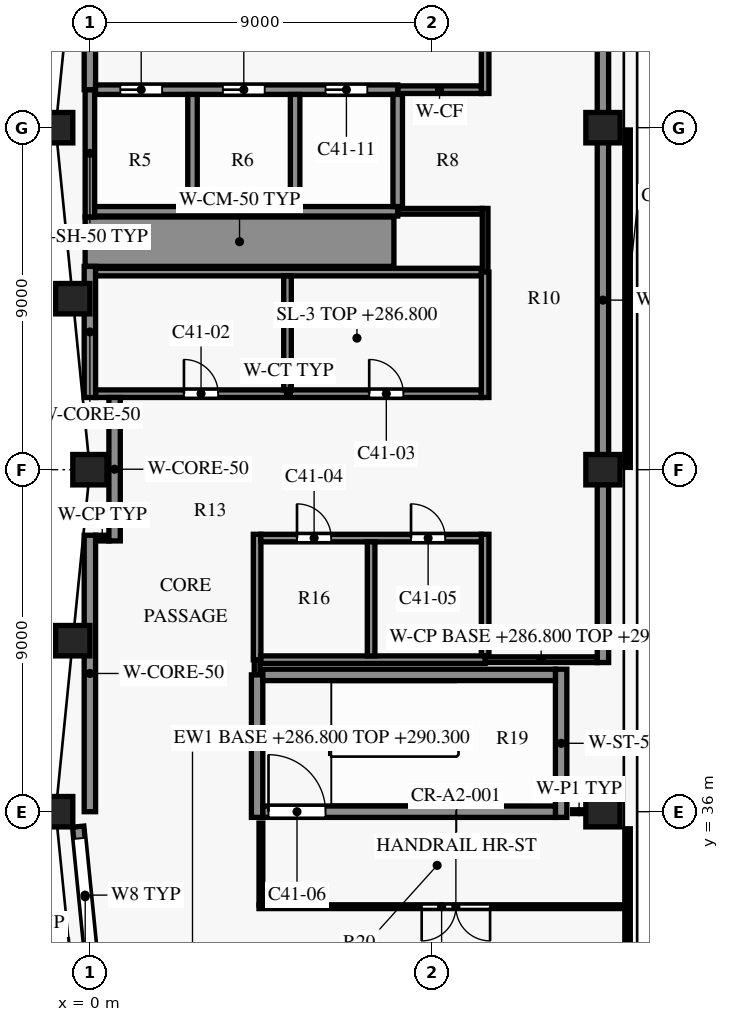
"""IFC4 building model, lengths in metres.
Left out: names, types, materials, properties, quantities, classifications, styles, units other than length and angle.
Written with IfcOpenShell. Run it as: python <this file> out.ifc"""

import sys

from ifc_helpers import new_model, si_unit, direction, frame, frame_2d, origin, origin_2d, place, context, subcontext, project, spatial, rectangle, extrude, element, fill, save


model = new_model("IFC4")
c1 = context("Model", 3, precision=1e-05, world=origin(), true_north=direction((0.0, 1.0)))
c2 = subcontext(c1, "Body", "Model", "MODEL_VIEW")
j1 = project(units=[si_unit("LENGTHUNIT", "METRE"), si_unit("PLANEANGLEUNIT", "RADIAN")], contexts=[c1])
p1 = place(None, origin())
s1 = spatial("IfcSite", under=j1, at=p1, CompositionType="ELEMENT")
p2 = place(p1, origin())
s2 = spatial("IfcBuilding", under=s1, at=p2, CompositionType="ELEMENT")
p3 = place(p2, frame((0.0, 0.0, 286.8)))
s3 = spatial("IfcBuildingStorey", under=s2, at=p3, CompositionType="ELEMENT", Elevation=286.8)
for number, where, z_axis, x_axis in (
    (1, (13.5, 36.0, 0.0), (0.0, 0.0, 1.0), (1.0, 0.0, 0.0)),
    (2, (13.5, 45.0, 0.0), (0.0, 0.0, 1.0), (1.0, 0.0, 0.0)),
    (3, (13.5, 54.0, 0.0), (0.0, 0.0, 1.0), (1.0, 0.0, 0.0)),
    (4, (-0.9, 54.0, 0.0), (0.0, 0.0, 1.0), (0.0, -1.0, 0.0)),
    (5, (-0.45, 49.5, 0.0), (0.0, 0.0, 1.0), (0.1, -0.995, 0.0)),
    (6, (0.0, 45.0, 0.0), (0.0, 0.0, 1.0), (0.0, -1.0, 0.0)),
    (7, (-0.45, 40.5, 0.0), (0.0, 0.0, 1.0), (-0.1, -0.995, 0.0)),
    (8, (-0.9, 36.0, 0.0), (0.0, 0.0, 1.0), (0.0, -1.0, 0.0)),
):
    element("IfcColumn", number, at=place(p3, frame(where, z_axis=z_axis, x_axis=x_axis)), inside=s3, PredefinedType="COLUMN", context=c2, shape_type="SweptSolid", body=[
        extrude(rectangle(XDim=0.9, YDim=0.8, at=origin_2d()), origin(), (0.0, 0.0, 1.0), 4.0),
    ])
p4 = place(p3, frame((0.061, 31.915, 0.0), z_axis=(0.0, 0.0, 1.0), x_axis=(-0.099549320092, 0.995032629048, 0.0)))
e9 = element("IfcWall", 9, at=p4, inside=s3, PredefinedType="SOLIDWALL", context=c2, shape_type="SweptSolid", body=[
    extrude(rectangle(XDim=3.71, YDim=0.3, at=frame_2d((1.855, 0.0))), origin(), (0.0, 0.0, 1.0), 3.5),
])
p5 = place(p4, frame((0.399, 0.0, 0.9)))
e10 = element("IfcOpeningElement", 10, at=p5, cuts=e9, PredefinedType="OPENING", context=c2, shape_type="SweptSolid", body=[
    extrude(rectangle(XDim=3.0, YDim=1.8, at=frame_2d((1.5, 0.9))), frame((0.0, 0.16, 0.0), z_axis=(0.0, -1.0, 0.0), x_axis=(1.0, 0.0, 0.0)), (0.0, 0.0, 1.0), 0.32),
])
p6 = place(p3, frame((4.55, 36.0, 0.0), z_axis=(0.0, 0.0, 1.0), x_axis=(1.0, 0.0, 0.0)))
e11 = element("IfcWall", 11, at=p6, inside=s3, PredefinedType="SHEAR", context=c2, shape_type="SweptSolid", body=[
    extrude(rectangle(XDim=7.7, YDim=0.3, at=frame_2d((3.85, 0.0))), origin(), (0.0, 0.0, 1.0), 3.7),
])
p7 = place(p6, frame((0.15, 0.0, 0.0)))
e12 = element("IfcOpeningElement", 12, at=p7, cuts=e11, PredefinedType="OPENING", context=c2, shape_type="SweptSolid", body=[
    extrude(rectangle(XDim=1.5, YDim=2.2, at=frame_2d((0.75, 1.1))), frame((0.0, 0.16, 0.0), z_axis=(0.0, -1.0, 0.0), x_axis=(1.0, 0.0, 0.0)), (0.0, 0.0, 1.0), 0.32),
])
p8 = place(p3, frame((4.55, 39.6, 0.0), z_axis=(0.0, 0.0, 1.0), x_axis=(1.0, 0.0, 0.0)))
e13 = element("IfcWall", 13, at=p8, inside=s3, PredefinedType="SHEAR", context=c2, shape_type="SweptSolid", body=[
    extrude(rectangle(XDim=7.7, YDim=0.3, at=frame_2d((3.85, 0.0))), origin(), (0.0, 0.0, 1.0), 3.7),
])
p9 = place(p3, frame((10.4, 40.0, 0.0), z_axis=(0.0, 0.0, 1.0), x_axis=(1.0, 0.0, 0.0)))
e14 = element("IfcWall", 14, at=p9, inside=s3, PredefinedType="PARTITIONING", context=c2, shape_type="SweptSolid", body=[
    extrude(rectangle(XDim=2.95, YDim=0.15, at=frame_2d((1.475, 0.0))), origin(), (0.0, 0.0, 1.0), 3.35),
])
p10 = place(p3, frame((4.5, 40.0, 0.0), z_axis=(0.0, 0.0, 1.0), x_axis=(1.0, 0.0, 0.0)))
e15 = element("IfcWall", 15, at=p10, inside=s3, PredefinedType="PARTITIONING", context=c2, shape_type="SweptSolid", body=[
    extrude(rectangle(XDim=5.9, YDim=0.2, at=frame_2d((2.95, 0.0))), origin(), (0.0, 0.0, 1.0), 3.7),
])
p11 = place(p3, frame((0.15, 43.2, 0.0), z_axis=(0.0, 0.0, 1.0), x_axis=(1.0, 0.0, 0.0)))
e16 = element("IfcWall", 16, at=p11, inside=s3, PredefinedType="PARTITIONING", context=c2, shape_type="SweptSolid", body=[
    extrude(rectangle(XDim=0.35, YDim=0.15, at=frame_2d((0.175, 0.0))), origin(), (0.0, 0.0, 1.0), 3.7),
])
p12 = place(p3, frame((4.5, 43.2, 0.0), z_axis=(0.0, 0.0, 1.0), x_axis=(1.0, 0.0, 0.0)))
e17 = element("IfcWall", 17, at=p12, inside=s3, PredefinedType="PARTITIONING", context=c2, shape_type="SweptSolid", body=[
    extrude(rectangle(XDim=5.8, YDim=0.2, at=frame_2d((2.9, 0.0))), origin(), (0.0, 0.0, 1.0), 3.7),
])
p13 = place(p12, frame((0.95, 0.0, 0.0)))
e18 = element("IfcOpeningElement", 18, at=p13, cuts=e17, PredefinedType="OPENING", context=c2, shape_type="SweptSolid", body=[
    extrude(rectangle(XDim=0.9, YDim=2.1, at=frame_2d((0.45, 1.05))), frame((0.0, 0.11, 0.0), z_axis=(0.0, -1.0, 0.0), x_axis=(1.0, 0.0, 0.0)), (0.0, 0.0, 1.0), 0.22),
])
p14 = place(p12, frame((3.95, 0.0, 0.0)))
e19 = element("IfcOpeningElement", 19, at=p14, cuts=e17, PredefinedType="OPENING", context=c2, shape_type="SweptSolid", body=[
    extrude(rectangle(XDim=0.9, YDim=2.1, at=frame_2d((0.45, 1.05))), frame((0.0, 0.11, 0.0), z_axis=(0.0, -1.0, 0.0), x_axis=(1.0, 0.0, 0.0)), (0.0, 0.0, 1.0), 0.22),
])
p15 = place(p3, frame((0.15, 47.0, 0.0), z_axis=(0.0, 0.0, 1.0), x_axis=(1.0, 0.0, 0.0)))
e20 = element("IfcWall", 20, at=p15, inside=s3, PredefinedType="PARTITIONING", context=c2, shape_type="SweptSolid", body=[
    extrude(rectangle(XDim=10.15, YDim=0.2, at=frame_2d((5.075, 0.0))), origin(), (0.0, 0.0, 1.0), 3.7),
])
p16 = place(p15, frame((2.325, 0.0, 0.0)))
e21 = element("IfcOpeningElement", 21, at=p16, cuts=e20, PredefinedType="OPENING", context=c2, shape_type="SweptSolid", body=[
    extrude(rectangle(XDim=0.9, YDim=2.1, at=frame_2d((0.45, 1.05))), frame((0.0, 0.11, 0.0), z_axis=(0.0, -1.0, 0.0), x_axis=(1.0, 0.0, 0.0)), (0.0, 0.0, 1.0), 0.22),
])
p17 = place(p15, frame((7.2, 0.0, 0.0)))
e22 = element("IfcOpeningElement", 22, at=p17, cuts=e20, PredefinedType="OPENING", context=c2, shape_type="SweptSolid", body=[
    extrude(rectangle(XDim=0.9, YDim=2.1, at=frame_2d((0.45, 1.05))), frame((0.0, 0.11, 0.0), z_axis=(0.0, -1.0, 0.0), x_axis=(1.0, 0.0, 0.0)), (0.0, 0.0, 1.0), 0.22),
])
p18 = place(p3, frame((0.15, 50.2, 0.0), z_axis=(0.0, 0.0, 1.0), x_axis=(1.0, 0.0, 0.0)))
e23 = element("IfcWall", 23, at=p18, inside=s3, PredefinedType="PARTITIONING", context=c2, shape_type="SweptSolid", body=[
    extrude(rectangle(XDim=10.15, YDim=0.2, at=frame_2d((5.075, 0.0))), origin(), (0.0, 0.0, 1.0), 3.7),
])
p19 = place(p3, frame((-0.125, 51.0, 0.0), z_axis=(0.0, 0.0, 1.0), x_axis=(1.0, 0.0, 0.0)))
e24 = element("IfcWall", 24, at=p19, inside=s3, PredefinedType="SHEAR", context=c2, shape_type="SweptSolid", body=[
    extrude(rectangle(XDim=8.125, YDim=1.3, at=frame_2d((4.062, 0.0))), origin(), (0.0, 0.0, 1.0), 3.7),
])
p20 = place(p3, frame((8.1, 51.8, 0.0), z_axis=(0.0, 0.0, 1.0), x_axis=(1.0, 0.0, 0.0)))
e25 = element("IfcWall", 25, at=p20, inside=s3, PredefinedType="PARTITIONING", context=c2, shape_type="SweptSolid", body=[
    extrude(rectangle(XDim=2.225, YDim=0.15, at=frame_2d((1.112, 0.0))), origin(), (0.0, 0.0, 1.0), 3.7),
])
p21 = place(p3, frame((0.125, 51.8, 0.0), z_axis=(0.0, 0.0, 1.0), x_axis=(1.0, 0.0, 0.0)))
e26 = element("IfcWall", 26, at=p21, inside=s3, PredefinedType="SHEAR", context=c2, shape_type="SweptSolid", body=[
    extrude(rectangle(XDim=7.975, YDim=0.25, at=frame_2d((3.988, 0.0))), origin(), (0.0, 0.0, 1.0), 3.7),
])
p22 = place(p3, frame((8.1, 55.0, 0.0), z_axis=(0.0, 0.0, 1.0), x_axis=(1.0, 0.0, 0.0)))
e27 = element("IfcWall", 27, at=p22, inside=s3, PredefinedType="PARTITIONING", context=c2, shape_type="SweptSolid", body=[
    extrude(rectangle(XDim=2.2, YDim=0.2, at=frame_2d((1.1, 0.0))), origin(), (0.0, 0.0, 1.0), 3.7),
])
p23 = place(p3, frame((0.15, 55.0, 0.0), z_axis=(0.0, 0.0, 1.0), x_axis=(1.0, 0.0, 0.0)))
e28 = element("IfcWall", 28, at=p23, inside=s3, PredefinedType="SHEAR", context=c2, shape_type="SweptSolid", body=[
    extrude(rectangle(XDim=7.95, YDim=0.25, at=frame_2d((3.975, 0.0))), origin(), (0.0, 0.0, 1.0), 3.7),
])
p24 = place(p23, frame((0.65, 0.0, 0.0)))
e29 = element("IfcOpeningElement", 29, at=p24, cuts=e28, PredefinedType="OPENING", context=c2, shape_type="SweptSolid", body=[
    extrude(rectangle(XDim=1.1, YDim=2.1, at=frame_2d((0.55, 1.05))), frame((0.0, 0.135, 0.0), z_axis=(0.0, -1.0, 0.0), x_axis=(1.0, 0.0, 0.0)), (0.0, 0.0, 1.0), 0.27),
])
p25 = place(p23, frame((3.35, 0.0, 0.0)))
e30 = element("IfcOpeningElement", 30, at=p25, cuts=e28, PredefinedType="OPENING", context=c2, shape_type="SweptSolid", body=[
    extrude(rectangle(XDim=1.1, YDim=2.1, at=frame_2d((0.55, 1.05))), frame((0.0, 0.135, 0.0), z_axis=(0.0, -1.0, 0.0), x_axis=(1.0, 0.0, 0.0)), (0.0, 0.0, 1.0), 0.27),
])
p26 = place(p23, frame((6.05, 0.0, 0.0)))
e31 = element("IfcOpeningElement", 31, at=p26, cuts=e28, PredefinedType="OPENING", context=c2, shape_type="SweptSolid", body=[
    extrude(rectangle(XDim=1.1, YDim=2.1, at=frame_2d((0.55, 1.05))), frame((0.0, 0.135, 0.0), z_axis=(0.0, -1.0, 0.0), x_axis=(1.0, 0.0, 0.0)), (0.0, 0.0, 1.0), 0.27),
])
p27 = place(p3, frame((0.0, 36.0, 0.0), z_axis=(0.0, 0.0, 1.0), x_axis=(0.0, 1.0, 0.0)))
e32 = element("IfcWall", 32, at=p27, inside=s3, PredefinedType="SHEAR", context=c2, shape_type="SweptSolid", body=[
    extrude(rectangle(XDim=7.275, YDim=0.3, at=frame_2d((3.637, 0.0))), origin(), (0.0, 0.0, 1.0), 3.7),
])
p28 = place(p3, frame((0.0, 46.9, 0.0), z_axis=(0.0, 0.0, 1.0), x_axis=(0.0, 1.0, 0.0)))
e33 = element("IfcWall", 33, at=p28, inside=s3, PredefinedType="SHEAR", context=c2, shape_type="SweptSolid", body=[
    extrude(rectangle(XDim=3.45, YDim=0.3, at=frame_2d((1.725, 0.0))), origin(), (0.0, 0.0, 1.0), 3.7),
])
p29 = place(p3, frame((0.0, 55.0, 0.0), z_axis=(0.0, 0.0, 1.0), x_axis=(0.0, 1.0, 0.0)))
e34 = element("IfcWall", 34, at=p29, inside=s3, PredefinedType="SHEAR", context=c2, shape_type="SweptSolid", body=[
    extrude(rectangle(XDim=3.0, YDim=0.3, at=frame_2d((1.5, 0.0))), origin(), (0.0, 0.0, 1.0), 3.7),
])
p30 = place(p3, frame((0.0, 51.65, 0.0), z_axis=(0.0, 0.0, 1.0), x_axis=(0.0, 1.0, 0.0)))
e35 = element("IfcWall", 35, at=p30, inside=s3, PredefinedType="SHEAR", context=c2, shape_type="SweptSolid", body=[
    extrude(rectangle(XDim=3.35, YDim=0.25, at=frame_2d((1.675, 0.0))), origin(), (0.0, 0.0, 1.0), 3.7),
])
p31 = place(p3, frame((0.65, 43.125, 0.0), z_axis=(0.0, 0.0, 1.0), x_axis=(0.0, 1.0, 0.0)))
e36 = element("IfcWall", 36, at=p31, inside=s3, PredefinedType="SHEAR", context=c2, shape_type="SweptSolid", body=[
    extrude(rectangle(XDim=3.775, YDim=0.3, at=frame_2d((1.887, 0.0))), origin(), (0.0, 0.0, 1.0), 3.7),
])
p32 = place(p3, frame((2.7, 51.925, 0.0), z_axis=(0.0, 0.0, 1.0), x_axis=(0.0, 1.0, 0.0)))
e37 = element("IfcWall", 37, at=p32, inside=s3, PredefinedType="SHEAR", context=c2, shape_type="SweptSolid", body=[
    extrude(rectangle(XDim=2.95, YDim=0.25, at=frame_2d((1.475, 0.0))), origin(), (0.0, 0.0, 1.0), 3.7),
])
p33 = place(p3, frame((4.4, 39.6, 0.0), z_axis=(0.0, 0.0, 1.0), x_axis=(0.0, 1.0, 0.0)))
e38 = element("IfcWall", 38, at=p33, inside=s3, PredefinedType="PARTITIONING", context=c2, shape_type="SweptSolid", body=[
    extrude(rectangle(XDim=0.4, YDim=0.15, at=frame_2d((0.2, 0.0))), origin(), (0.0, 0.0, 1.0), 3.7),
])
p34 = place(p3, frame((4.4, 40.0, 0.0), z_axis=(0.0, 0.0, 1.0), x_axis=(0.0, 1.0, 0.0)))
e39 = element("IfcWall", 39, at=p34, inside=s3, PredefinedType="PARTITIONING", context=c2, shape_type="SweptSolid", body=[
    extrude(rectangle(XDim=3.3, YDim=0.2, at=frame_2d((1.65, 0.0))), origin(), (0.0, 0.0, 1.0), 3.7),
])
p35 = place(p3, frame((4.4, 35.85, 0.0), z_axis=(0.0, 0.0, 1.0), x_axis=(0.0, 1.0, 0.0)))
e40 = element("IfcWall", 40, at=p35, inside=s3, PredefinedType="SHEAR", context=c2, shape_type="SweptSolid", body=[
    extrude(rectangle(XDim=3.75, YDim=0.3, at=frame_2d((1.875, 0.0))), origin(), (0.0, 0.0, 1.0), 3.7),
])
p36 = place(p3, frame((5.2, 47.1, 0.0), z_axis=(0.0, 0.0, 1.0), x_axis=(0.0, 1.0, 0.0)))
e41 = element("IfcWall", 41, at=p36, inside=s3, PredefinedType="PARTITIONING", context=c2, shape_type="SweptSolid", body=[
    extrude(rectangle(XDim=3.0, YDim=0.2, at=frame_2d((1.5, 0.0))), origin(), (0.0, 0.0, 1.0), 3.7),
])
p37 = place(p3, frame((5.4, 51.925, 0.0), z_axis=(0.0, 0.0, 1.0), x_axis=(0.0, 1.0, 0.0)))
e42 = element("IfcWall", 42, at=p37, inside=s3, PredefinedType="SHEAR", context=c2, shape_type="SweptSolid", body=[
    extrude(rectangle(XDim=2.95, YDim=0.25, at=frame_2d((1.475, 0.0))), origin(), (0.0, 0.0, 1.0), 3.7),
])
p38 = place(p3, frame((7.4, 40.1, 0.0), z_axis=(0.0, 0.0, 1.0), x_axis=(0.0, 1.0, 0.0)))
e43 = element("IfcWall", 43, at=p38, inside=s3, PredefinedType="PARTITIONING", context=c2, shape_type="SweptSolid", body=[
    extrude(rectangle(XDim=3.0, YDim=0.2, at=frame_2d((1.5, 0.0))), origin(), (0.0, 0.0, 1.0), 3.7),
])
p39 = place(p3, frame((8.1, 51.925, 0.0), z_axis=(0.0, 0.0, 1.0), x_axis=(0.0, 1.0, 0.0)))
e44 = element("IfcWall", 44, at=p39, inside=s3, PredefinedType="SHEAR", context=c2, shape_type="SweptSolid", body=[
    extrude(rectangle(XDim=2.95, YDim=0.25, at=frame_2d((1.475, 0.0))), origin(), (0.0, 0.0, 1.0), 3.7),
])
p40 = place(p3, frame((10.4, 54.9, 0.0), z_axis=(0.0, 0.0, 1.0), x_axis=(0.0, 1.0, 0.0)))
e45 = element("IfcWall", 45, at=p40, inside=s3, PredefinedType="PARTITIONING", context=c2, shape_type="SweptSolid", body=[
    extrude(rectangle(XDim=3.95, YDim=0.2, at=frame_2d((1.975, 0.0))), origin(), (0.0, 0.0, 1.0), 3.7),
])
p41 = place(p40, frame((1.5, 0.0, 0.0)))
e46 = element("IfcOpeningElement", 46, at=p41, cuts=e45, PredefinedType="OPENING", context=c2, shape_type="SweptSolid", body=[
    extrude(rectangle(XDim=1.2, YDim=2.2, at=frame_2d((0.6, 1.1))), frame((0.0, 0.11, 0.0), z_axis=(0.0, -1.0, 0.0), x_axis=(1.0, 0.0, 0.0)), (0.0, 0.0, 1.0), 0.22),
])
p42 = place(p3, frame((10.4, 50.2, 0.0), z_axis=(0.0, 0.0, 1.0), x_axis=(0.0, 1.0, 0.0)))
e47 = element("IfcWall", 47, at=p42, inside=s3, PredefinedType="PARTITIONING", context=c2, shape_type="SweptSolid", body=[
    extrude(rectangle(XDim=1.675, YDim=0.15, at=frame_2d((0.837, 0.0))), origin(), (0.0, 0.0, 1.0), 3.7),
])
p43 = place(p3, frame((10.4, 40.1, 0.0), z_axis=(0.0, 0.0, 1.0), x_axis=(0.0, 1.0, 0.0)))
e48 = element("IfcWall", 48, at=p43, inside=s3, PredefinedType="PARTITIONING", context=c2, shape_type="SweptSolid", body=[
    extrude(rectangle(XDim=3.2, YDim=0.2, at=frame_2d((1.6, 0.0))), origin(), (0.0, 0.0, 1.0), 3.7),
])
p44 = place(p3, frame((10.4, 46.9, 0.0), z_axis=(0.0, 0.0, 1.0), x_axis=(0.0, 1.0, 0.0)))
e49 = element("IfcWall", 49, at=p44, inside=s3, PredefinedType="PARTITIONING", context=c2, shape_type="SweptSolid", body=[
    extrude(rectangle(XDim=3.3, YDim=0.2, at=frame_2d((1.65, 0.0))), origin(), (0.0, 0.0, 1.0), 3.7),
])
p45 = place(p3, frame((12.4, 35.85, 0.0), z_axis=(0.0, 0.0, 1.0), x_axis=(0.0, 1.0, 0.0)))
e50 = element("IfcWall", 50, at=p45, inside=s3, PredefinedType="SHEAR", context=c2, shape_type="SweptSolid", body=[
    extrude(rectangle(XDim=3.9, YDim=0.3, at=frame_2d((1.95, 0.0))), origin(), (0.0, 0.0, 1.0), 3.7),
])
p46 = place(p3, frame((13.5, 39.925, 0.0), z_axis=(0.0, 0.0, 1.0), x_axis=(0.0, 1.0, 0.0)))
e51 = element("IfcWall", 51, at=p46, inside=s3, PredefinedType="SHEAR", context=c2, shape_type="SweptSolid", body=[
    extrude(rectangle(XDim=19.075, YDim=0.3, at=frame_2d((9.538, 0.0))), origin(), (0.0, 0.0, 1.0), 3.7),
])
p47 = place(p3, frame((14.06, 33.5, 0.0), z_axis=(0.0, 0.0, 1.0), x_axis=(-1.0, 0.0, 0.0)))
e52 = element("IfcWall", 52, at=p47, inside=s3, PredefinedType="PARTITIONING", context=c2, shape_type="SweptSolid", body=[
    extrude(rectangle(XDim=9.61, YDim=0.1, at=frame_2d((4.805, 0.0))), origin(), (0.0, 0.0, 1.0), 3.33),
])
p48 = place(p47, frame((3.53, 0.0, 0.0)))
e53 = element("IfcOpeningElement", 53, at=p48, cuts=e52, PredefinedType="OPENING", context=c2, shape_type="SweptSolid", body=[
    extrude(rectangle(XDim=1.8, YDim=2.1, at=frame_2d((0.9, 1.05))), frame((0.0, 0.06, 0.0), z_axis=(0.0, -1.0, 0.0), x_axis=(1.0, 0.0, 0.0)), (0.0, 0.0, 1.0), 0.12),
])
p49 = place(p3, frame((4.5, 33.55, 0.0), z_axis=(0.0, 0.0, 1.0), x_axis=(0.0, 1.0, 0.0)))
e54 = element("IfcWall", 54, at=p49, inside=s3, PredefinedType="PARTITIONING", context=c2, shape_type="SweptSolid", body=[
    extrude(rectangle(XDim=2.15, YDim=0.1, at=frame_2d((1.075, 0.0))), origin(), (0.0, 0.0, 1.0), 3.68),
])
p50 = place(p3, frame((12.7, 36.0, 0.0), z_axis=(0.0, 0.0, 1.0), x_axis=(1.0, 0.0, 0.0)))
e55 = element("IfcWall", 55, at=p50, inside=s3, PredefinedType="PARTITIONING", context=c2, shape_type="SweptSolid", body=[
    extrude(rectangle(XDim=0.345, YDim=0.1, at=frame_2d((0.172, 0.0))), origin(), (0.0, 0.0, 1.0), 3.68),
])
p51 = place(p5, origin())
e56 = element("IfcWindow", 56, at=p51, inside=s3, PartitioningType="SINGLE_PANEL", PredefinedType="WINDOW", context=c2, shape_type="SweptSolid", body=[
    extrude(rectangle(XDim=3.0, YDim=1.8, at=frame_2d((1.5, 0.9))), frame((0.0, 0.03, 0.0), z_axis=(0.0, -1.0, 0.0), x_axis=(1.0, 0.0, 0.0)), (0.0, 0.0, 1.0), 0.06),
])
fill(e10, e56)
p52 = place(p16, origin())
e57 = element("IfcDoor", 57, at=p52, inside=s3, OperationType="SINGLE_SWING_RIGHT", PredefinedType="DOOR", context=c2, shape_type="SweptSolid", body=[
    extrude(rectangle(XDim=0.9, YDim=2.1, at=frame_2d((0.45, 1.05))), frame((0.0, 0.025, 0.0), z_axis=(0.0, -1.0, 0.0), x_axis=(1.0, 0.0, 0.0)), (0.0, 0.0, 1.0), 0.05),
])
fill(e21, e57)
p53 = place(p17, origin())
e58 = element("IfcDoor", 58, at=p53, inside=s3, OperationType="SINGLE_SWING_LEFT", PredefinedType="DOOR", context=c2, shape_type="SweptSolid", body=[
    extrude(rectangle(XDim=0.9, YDim=2.1, at=frame_2d((0.45, 1.05))), frame((0.0, 0.025, 0.0), z_axis=(0.0, -1.0, 0.0), x_axis=(1.0, 0.0, 0.0)), (0.0, 0.0, 1.0), 0.05),
])
fill(e22, e58)
p54 = place(p13, origin())
e59 = element("IfcDoor", 59, at=p54, inside=s3, OperationType="SINGLE_SWING_LEFT", PredefinedType="DOOR", context=c2, shape_type="SweptSolid", body=[
    extrude(rectangle(XDim=0.9, YDim=2.1, at=frame_2d((0.45, 1.05))), frame((0.0, 0.025, 0.0), z_axis=(0.0, -1.0, 0.0), x_axis=(1.0, 0.0, 0.0)), (0.0, 0.0, 1.0), 0.05),
])
fill(e18, e59)
p55 = place(p14, origin())
e60 = element("IfcDoor", 60, at=p55, inside=s3, OperationType="SINGLE_SWING_RIGHT", PredefinedType="DOOR", context=c2, shape_type="SweptSolid", body=[
    extrude(rectangle(XDim=0.9, YDim=2.1, at=frame_2d((0.45, 1.05))), frame((0.0, 0.025, 0.0), z_axis=(0.0, -1.0, 0.0), x_axis=(1.0, 0.0, 0.0)), (0.0, 0.0, 1.0), 0.05),
])
fill(e19, e60)
p56 = place(p7, origin())
e61 = element("IfcDoor", 61, at=p56, inside=s3, OperationType="SINGLE_SWING_RIGHT", PredefinedType="DOOR", context=c2, shape_type="SweptSolid", body=[
    extrude(rectangle(XDim=1.5, YDim=2.2, at=frame_2d((0.75, 1.1))), frame((0.0, 0.025, 0.0), z_axis=(0.0, -1.0, 0.0), x_axis=(1.0, 0.0, 0.0)), (0.0, 0.0, 1.0), 0.05),
])
fill(e12, e61)
p57 = place(p24, origin())
e62 = element("IfcDoor", 62, at=p57, inside=s3, OperationType="DOUBLE_DOOR_SLIDING", PredefinedType="DOOR", context=c2, shape_type="SweptSolid", body=[
    extrude(rectangle(XDim=1.1, YDim=2.1, at=frame_2d((0.55, 1.05))), frame((0.0, 0.025, 0.0), z_axis=(0.0, -1.0, 0.0), x_axis=(1.0, 0.0, 0.0)), (0.0, 0.0, 1.0), 0.05),
])
fill(e29, e62)
p58 = place(p25, origin())
e63 = element("IfcDoor", 63, at=p58, inside=s3, OperationType="DOUBLE_DOOR_SLIDING", PredefinedType="DOOR", context=c2, shape_type="SweptSolid", body=[
    extrude(rectangle(XDim=1.1, YDim=2.1, at=frame_2d((0.55, 1.05))), frame((0.0, 0.025, 0.0), z_axis=(0.0, -1.0, 0.0), x_axis=(1.0, 0.0, 0.0)), (0.0, 0.0, 1.0), 0.05),
])
fill(e30, e63)
p59 = place(p26, origin())
e64 = element("IfcDoor", 64, at=p59, inside=s3, OperationType="DOUBLE_DOOR_SLIDING", PredefinedType="DOOR", context=c2, shape_type="SweptSolid", body=[
    extrude(rectangle(XDim=1.1, YDim=2.1, at=frame_2d((0.55, 1.05))), frame((0.0, 0.025, 0.0), z_axis=(0.0, -1.0, 0.0), x_axis=(1.0, 0.0, 0.0)), (0.0, 0.0, 1.0), 0.05),
])
fill(e31, e64)
p60 = place(p48, origin())
e65 = element("IfcDoor", 65, at=p60, inside=s3, OperationType="DOUBLE_DOOR_SINGLE_SWING", PredefinedType="DOOR", context=c2, shape_type="SweptSolid", body=[
    extrude(rectangle(XDim=1.8, YDim=2.1, at=frame_2d((0.9, 1.05))), frame((0.0, 0.025, 0.0), z_axis=(0.0, -1.0, 0.0), x_axis=(1.0, 0.0, 0.0)), (0.0, 0.0, 1.0), 0.05),
])
fill(e53, e65)
save(model, sys.argv[1])
